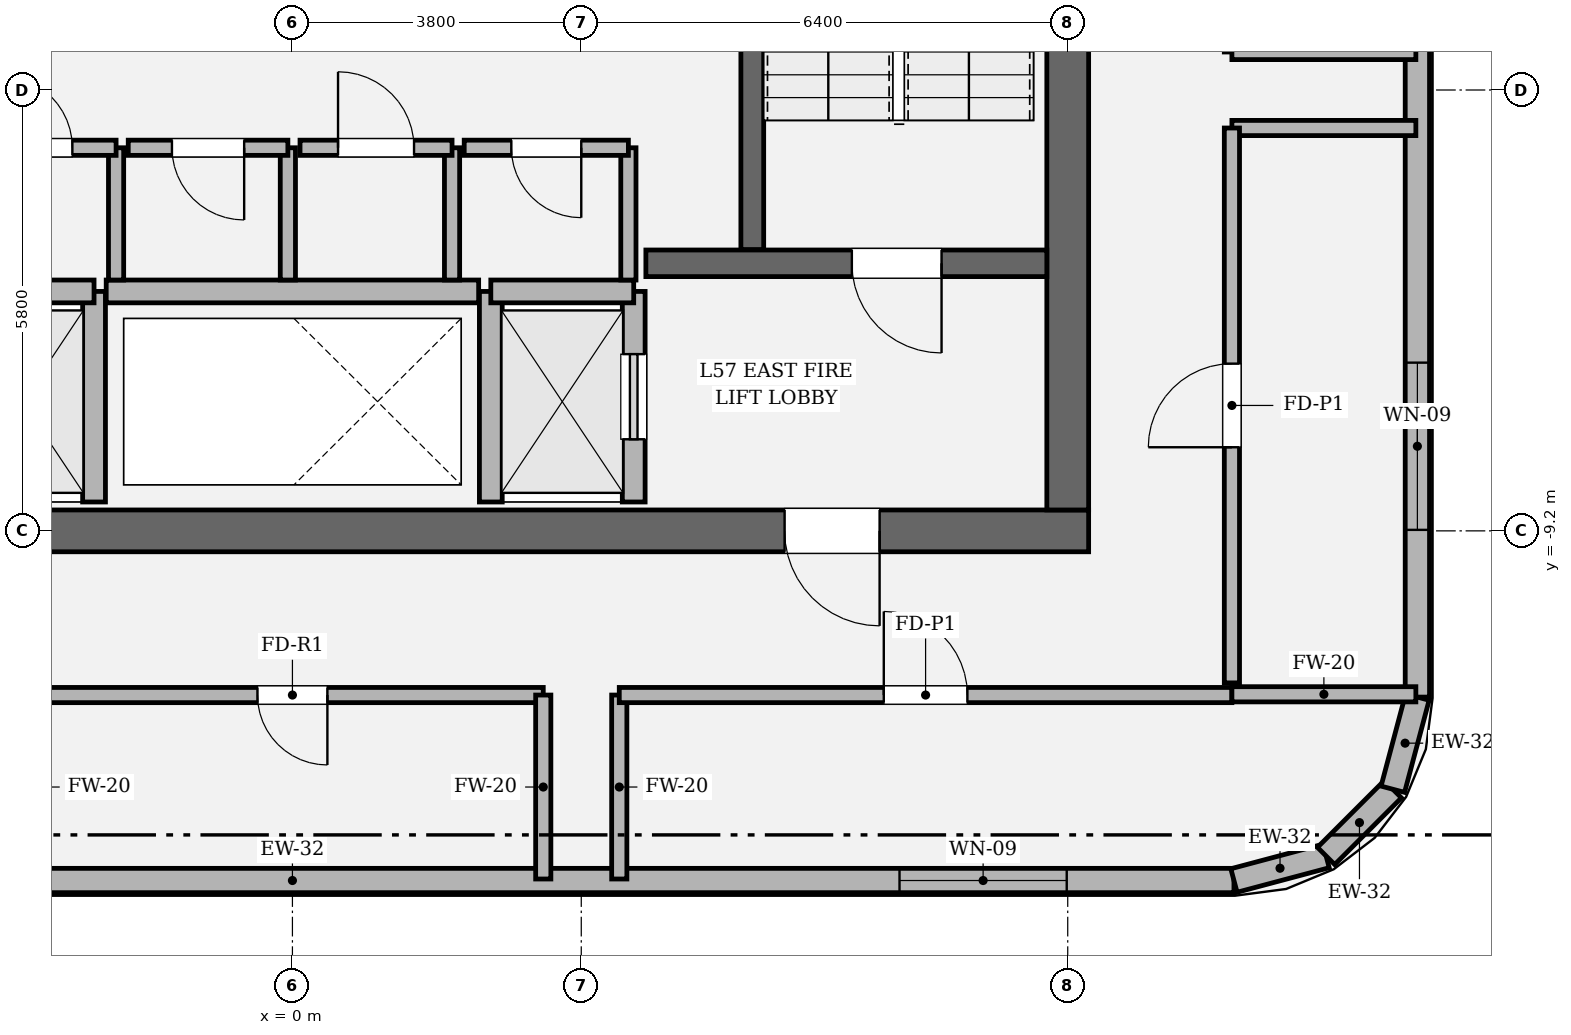
"""IFC4 building model, lengths in metres.
Left out: names, types, materials, properties, quantities, classifications, styles, units other than length and angle.
Written with IfcOpenShell. Run it as: python <this file> out.ifc"""

import sys

from ifc_helpers import new_model, si_unit, direction, frame, frame_2d, origin, place, context, subcontext, project, spatial, rectangle, extrude, element, fill, save


model = new_model("IFC4")
c1 = context("Model", 3, precision=1e-05, world=origin(), true_north=direction((0.0, 1.0)))
c2 = subcontext(c1, "Body", "Model", "MODEL_VIEW")
j1 = project(units=[si_unit("LENGTHUNIT", "METRE"), si_unit("PLANEANGLEUNIT", "RADIAN")], contexts=[c1])
p1 = place(None, origin())
s1 = spatial("IfcSite", under=j1, at=p1, CompositionType="ELEMENT")
p2 = place(p1, origin())
s2 = spatial("IfcBuilding", under=s1, at=p2, CompositionType="ELEMENT")
p3 = place(p2, frame((0.0, 0.0, 241.8)))
s3 = spatial("IfcBuildingStorey", under=s2, at=p3, CompositionType="ELEMENT", Elevation=241.8)
p4 = place(p3, frame((10.475, -9.2, 0.0), z_axis=(0.0, 0.0, 1.0), x_axis=(-1.0, 0.0, 0.0)))
e1 = element("IfcWall", 1, at=p4, inside=s3, PredefinedType="SHEAR", context=c2, shape_type="SweptSolid", body=[
    extrude(rectangle(XDim=20.95, YDim=0.55, at=frame_2d((10.475, 0.0))), origin(), (0.0, 0.0, 1.0), 4.8),
])
p5 = place(p4, frame((2.75, 0.0, 0.0)))
e2 = element("IfcOpeningElement", 2, at=p5, cuts=e1, PredefinedType="OPENING", context=c2, shape_type="SweptSolid", body=[
    extrude(rectangle(XDim=1.25, YDim=2.25, at=frame_2d((0.625, 1.125))), frame((0.0, 0.285, 0.0), z_axis=(0.0, -1.0, 0.0), x_axis=(1.0, 0.0, 0.0)), (0.0, 0.0, 1.0), 0.57),
])
p6 = place(p4, frame((16.95, 0.0, 0.0)))
e3 = element("IfcOpeningElement", 3, at=p6, cuts=e1, PredefinedType="OPENING", context=c2, shape_type="SweptSolid", body=[
    extrude(rectangle(XDim=1.25, YDim=2.25, at=frame_2d((0.625, 1.125))), frame((0.0, 0.285, 0.0), z_axis=(0.0, -1.0, 0.0), x_axis=(1.0, 0.0, 0.0)), (0.0, 0.0, 1.0), 0.57),
])
p7 = place(p3, frame((10.2, 8.925, 0.0), z_axis=(0.0, 0.0, 1.0), x_axis=(0.0, -1.0, 0.0)))
e4 = element("IfcWall", 4, at=p7, inside=s3, PredefinedType="SHEAR", context=c2, shape_type="SweptSolid", body=[
    extrude(rectangle(XDim=17.85, YDim=0.55, at=frame_2d((8.925, 0.0))), origin(), (0.0, 0.0, 1.0), 4.8),
])
p8 = place(p7, frame((3.955, 0.0, 0.0)))
e5 = element("IfcOpeningElement", 5, at=p8, cuts=e4, PredefinedType="OPENING", context=c2, shape_type="SweptSolid", body=[
    extrude(rectangle(XDim=1.18, YDim=2.2, at=frame_2d((0.59, 1.1))), frame((0.0, 0.285, 0.0), z_axis=(0.0, -1.0, 0.0), x_axis=(1.0, 0.0, 0.0)), (0.0, 0.0, 1.0), 0.57),
])
p9 = place(p3, frame((6.05, 3.45, 0.0), z_axis=(0.0, 0.0, 1.0), x_axis=(0.0, -1.0, 0.0)))
e6 = element("IfcWall", 6, at=p9, inside=s3, PredefinedType="SOLIDWALL", context=c2, shape_type="SweptSolid", body=[
    extrude(rectangle(XDim=8.95, YDim=0.3, at=frame_2d((4.475, 0.0))), origin(), (0.0, 0.0, 1.0), 4.8),
])
p10 = place(p3, frame((4.65, -5.68, 0.0), z_axis=(0.0, 0.0, 1.0), x_axis=(1.0, 0.0, 0.0)))
e7 = element("IfcWall", 7, at=p10, inside=s3, PredefinedType="SOLIDWALL", context=c2, shape_type="SweptSolid", body=[
    extrude(rectangle(XDim=5.275, YDim=0.35, at=frame_2d((2.638, 0.0))), origin(), (0.0, 0.0, 1.0), 4.8),
])
p11 = place(p10, frame((2.71, 0.0, 0.0)))
e8 = element("IfcOpeningElement", 8, at=p11, cuts=e7, PredefinedType="OPENING", context=c2, shape_type="SweptSolid", body=[
    extrude(rectangle(XDim=1.18, YDim=2.2, at=frame_2d((0.59, 1.1))), frame((0.0, 0.185, 0.0), z_axis=(0.0, -1.0, 0.0), x_axis=(1.0, 0.0, 0.0)), (0.0, 0.0, 1.0), 0.37),
])
p12 = place(p3, frame((-12.387, -13.8, 0.0), z_axis=(0.0, 0.0, 1.0), x_axis=(1.0, 0.0, 0.0)))
e9 = element("IfcWall", 9, at=p12, inside=s3, PredefinedType="SOLIDWALL", context=c2, shape_type="SweptSolid", body=[
    extrude(rectangle(XDim=24.774, YDim=0.32, at=frame_2d((12.387, 0.0))), origin(), (0.0, 0.0, 1.0), 3.884),
])
p13 = place(p12, frame((2.2, 0.0, 0.9)))
e10 = element("IfcOpeningElement", 10, at=p13, cuts=e9, PredefinedType="OPENING", context=c2, shape_type="SweptSolid", body=[
    extrude(rectangle(XDim=2.2, YDim=1.2, at=frame_2d((1.1, 0.6))), frame((0.0, 0.17, 0.0), z_axis=(0.0, -1.0, 0.0), x_axis=(1.0, 0.0, 0.0)), (0.0, 0.0, 1.0), 0.34),
])
p14 = place(p12, frame((20.374, 0.0, 0.9)))
e11 = element("IfcOpeningElement", 11, at=p14, cuts=e9, PredefinedType="OPENING", context=c2, shape_type="SweptSolid", body=[
    extrude(rectangle(XDim=2.2, YDim=1.2, at=frame_2d((1.1, 0.6))), frame((0.0, 0.17, 0.0), z_axis=(0.0, -1.0, 0.0), x_axis=(1.0, 0.0, 0.0)), (0.0, 0.0, 1.0), 0.34),
])
p15 = place(p3, frame((12.387, -13.8, 0.0), z_axis=(0.0, 0.0, 1.0), x_axis=(0.966283375382, 0.25748094776, 0.0)))
e12 = element("IfcWall", 12, at=p15, inside=s3, PredefinedType="SOLIDWALL", context=c2, shape_type="SweptSolid", body=[
    extrude(rectangle(XDim=1.254, YDim=0.32, at=frame_2d((0.627, 0.0))), origin(), (0.0, 0.0, 1.0), 4.034),
])
p16 = place(p3, frame((13.599, -13.477, 0.0), z_axis=(0.0, 0.0, 1.0), x_axis=(0.707106781187, 0.707106781187, 0.0)))
e13 = element("IfcWall", 13, at=p16, inside=s3, PredefinedType="SOLIDWALL", context=c2, shape_type="SweptSolid", body=[
    extrude(rectangle(XDim=1.242, YDim=0.32, at=frame_2d((0.621, 0.0))), origin(), (0.0, 0.0, 1.0), 4.034),
])
p17 = place(p3, frame((14.477, -12.599, 0.0), z_axis=(0.0, 0.0, 1.0), x_axis=(0.25748094776, 0.966283375382, 0.0)))
e14 = element("IfcWall", 14, at=p17, inside=s3, PredefinedType="SOLIDWALL", context=c2, shape_type="SweptSolid", body=[
    extrude(rectangle(XDim=1.254, YDim=0.32, at=frame_2d((0.627, 0.0))), origin(), (0.0, 0.0, 1.0), 4.034),
])
p18 = place(p3, frame((14.8, -11.387, 0.0), z_axis=(0.0, 0.0, 1.0), x_axis=(0.0, 1.0, 0.0)))
e15 = element("IfcWall", 15, at=p18, inside=s3, PredefinedType="SOLIDWALL", context=c2, shape_type="SweptSolid", body=[
    extrude(rectangle(XDim=22.774, YDim=0.32, at=frame_2d((11.387, 0.0))), origin(), (0.0, 0.0, 1.0), 3.884),
])
p19 = place(p18, frame((2.2, 0.0, 0.9)))
e16 = element("IfcOpeningElement", 16, at=p19, cuts=e15, PredefinedType="OPENING", context=c2, shape_type="SweptSolid", body=[
    extrude(rectangle(XDim=2.2, YDim=1.2, at=frame_2d((1.1, 0.6))), frame((0.0, 0.17, 0.0), z_axis=(0.0, -1.0, 0.0), x_axis=(1.0, 0.0, 0.0)), (0.0, 0.0, 1.0), 0.34),
])
p20 = place(p18, frame((18.374, 0.0, 0.9)))
e17 = element("IfcOpeningElement", 17, at=p20, cuts=e15, PredefinedType="OPENING", context=c2, shape_type="SweptSolid", body=[
    extrude(rectangle(XDim=2.2, YDim=1.2, at=frame_2d((1.1, 0.6))), frame((0.0, 0.17, 0.0), z_axis=(0.0, -1.0, 0.0), x_axis=(1.0, 0.0, 0.0)), (0.0, 0.0, 1.0), 0.34),
])
p21 = place(p3, frame((-2.61, -8.82, 0.0), z_axis=(0.0, 0.0, 1.0), x_axis=(0.0, 1.0, 0.0)))
e18 = element("IfcWall", 18, at=p21, inside=s3, PredefinedType="SOLIDWALL", context=c2, shape_type="SweptSolid", body=[
    extrude(rectangle(XDim=2.77, YDim=0.3, at=frame_2d((1.385, 0.0))), origin(), (0.0, 0.0, 1.0), 4.54),
])
p22 = place(p3, frame((-4.49, -6.05, 0.0), z_axis=(0.0, 0.0, 1.0), x_axis=(1.0, 0.0, 0.0)))
e19 = element("IfcWall", 19, at=p22, inside=s3, PredefinedType="SOLIDWALL", context=c2, shape_type="SweptSolid", body=[
    extrude(rectangle(XDim=1.88, YDim=0.3, at=frame_2d((0.94, 0.0))), origin(), (0.0, 0.0, 1.0), 4.54),
])
p23 = place(p3, frame((4.49, -8.82, 0.0), z_axis=(0.0, 0.0, 1.0), x_axis=(0.0, 1.0, 0.0)))
e20 = element("IfcWall", 20, at=p23, inside=s3, PredefinedType="SOLIDWALL", context=c2, shape_type="SweptSolid", body=[
    extrude(rectangle(XDim=2.77, YDim=0.3, at=frame_2d((1.385, 0.0))), origin(), (0.0, 0.0, 1.0), 4.54),
])
p24 = place(p23, frame((0.825, 0.0, 0.0)))
e21 = element("IfcOpeningElement", 21, at=p24, cuts=e20, PredefinedType="OPENING", context=c2, shape_type="SweptSolid", body=[
    extrude(rectangle(XDim=1.12, YDim=2.25, at=frame_2d((0.56, 1.125))), frame((0.0, 0.16, 0.0), z_axis=(0.0, -1.0, 0.0), x_axis=(1.0, 0.0, 0.0)), (0.0, 0.0, 1.0), 0.32),
])
p25 = place(p3, frame((2.61, -8.82, 0.0), z_axis=(0.0, 0.0, 1.0), x_axis=(0.0, 1.0, 0.0)))
e22 = element("IfcWall", 22, at=p25, inside=s3, PredefinedType="SOLIDWALL", context=c2, shape_type="SweptSolid", body=[
    extrude(rectangle(XDim=2.77, YDim=0.3, at=frame_2d((1.385, 0.0))), origin(), (0.0, 0.0, 1.0), 4.54),
])
p26 = place(p3, frame((2.61, -6.05, 0.0), z_axis=(0.0, 0.0, 1.0), x_axis=(1.0, 0.0, 0.0)))
e23 = element("IfcWall", 23, at=p26, inside=s3, PredefinedType="SOLIDWALL", context=c2, shape_type="SweptSolid", body=[
    extrude(rectangle(XDim=1.88, YDim=0.3, at=frame_2d((0.94, 0.0))), origin(), (0.0, 0.0, 1.0), 4.54),
])
p27 = place(p3, frame((-2.45, -6.05, 0.0), z_axis=(0.0, 0.0, 1.0), x_axis=(1.0, 0.0, 0.0)))
e24 = element("IfcWall", 24, at=p27, inside=s3, PredefinedType="SOLIDWALL", context=c2, shape_type="SweptSolid", body=[
    extrude(rectangle(XDim=4.9, YDim=0.3, at=frame_2d((2.45, 0.0))), origin(), (0.0, 0.0, 1.0), 4.54),
])
p28 = place(p3, frame((-2.32, -5.9, 0.0), z_axis=(0.0, 0.0, 1.0), x_axis=(0.0, 1.0, 0.0)))
e25 = element("IfcWall", 25, at=p28, inside=s3, PredefinedType="SOLIDWALL", context=c2, shape_type="SweptSolid", body=[
    extrude(rectangle(XDim=1.74, YDim=0.2, at=frame_2d((0.87, 0.0))), origin(), (0.0, 0.0, 1.0), 4.54),
])
p29 = place(p3, frame((-2.32, -4.16, 0.0), z_axis=(0.0, 0.0, 1.0), x_axis=(-1.0, 0.0, 0.0)))
e26 = element("IfcWall", 26, at=p29, inside=s3, PredefinedType="SOLIDWALL", context=c2, shape_type="SweptSolid", body=[
    extrude(rectangle(XDim=2.1, YDim=0.2, at=frame_2d((1.05, 0.0))), origin(), (0.0, 0.0, 1.0), 4.54),
])
p30 = place(p29, frame((0.575, 0.0, 0.0)))
e27 = element("IfcOpeningElement", 27, at=p30, cuts=e26, PredefinedType="OPENING", context=c2, shape_type="SweptSolid", body=[
    extrude(rectangle(XDim=0.95, YDim=2.15, at=frame_2d((0.475, 1.075))), frame((0.0, 0.11, 0.0), z_axis=(0.0, -1.0, 0.0), x_axis=(1.0, 0.0, 0.0)), (0.0, 0.0, 1.0), 0.22),
])
p31 = place(p3, frame((-0.06, -5.9, 0.0), z_axis=(0.0, 0.0, 1.0), x_axis=(0.0, 1.0, 0.0)))
e28 = element("IfcWall", 28, at=p31, inside=s3, PredefinedType="SOLIDWALL", context=c2, shape_type="SweptSolid", body=[
    extrude(rectangle(XDim=1.74, YDim=0.2, at=frame_2d((0.87, 0.0))), origin(), (0.0, 0.0, 1.0), 4.54),
])
p32 = place(p3, frame((-0.06, -4.16, 0.0), z_axis=(0.0, 0.0, 1.0), x_axis=(-1.0, 0.0, 0.0)))
e29 = element("IfcWall", 29, at=p32, inside=s3, PredefinedType="SOLIDWALL", context=c2, shape_type="SweptSolid", body=[
    extrude(rectangle(XDim=2.1, YDim=0.2, at=frame_2d((1.05, 0.0))), origin(), (0.0, 0.0, 1.0), 4.54),
])
p33 = place(p32, frame((0.575, 0.0, 0.0)))
e30 = element("IfcOpeningElement", 30, at=p33, cuts=e29, PredefinedType="OPENING", context=c2, shape_type="SweptSolid", body=[
    extrude(rectangle(XDim=0.95, YDim=2.15, at=frame_2d((0.475, 1.075))), frame((0.0, 0.11, 0.0), z_axis=(0.0, -1.0, 0.0), x_axis=(1.0, 0.0, 0.0)), (0.0, 0.0, 1.0), 0.22),
])
p34 = place(p3, frame((2.1, -5.9, 0.0), z_axis=(0.0, 0.0, 1.0), x_axis=(0.0, 1.0, 0.0)))
e31 = element("IfcWall", 31, at=p34, inside=s3, PredefinedType="SOLIDWALL", context=c2, shape_type="SweptSolid", body=[
    extrude(rectangle(XDim=1.74, YDim=0.2, at=frame_2d((0.87, 0.0))), origin(), (0.0, 0.0, 1.0), 4.54),
])
p35 = place(p3, frame((2.1, -4.16, 0.0), z_axis=(0.0, 0.0, 1.0), x_axis=(-1.0, 0.0, 0.0)))
e32 = element("IfcWall", 32, at=p35, inside=s3, PredefinedType="SOLIDWALL", context=c2, shape_type="SweptSolid", body=[
    extrude(rectangle(XDim=2.0, YDim=0.2, at=frame_2d((1.0, 0.0))), origin(), (0.0, 0.0, 1.0), 4.54),
])
p36 = place(p35, frame((0.5, 0.0, 0.0)))
e33 = element("IfcOpeningElement", 33, at=p36, cuts=e32, PredefinedType="OPENING", context=c2, shape_type="SweptSolid", body=[
    extrude(rectangle(XDim=1.0, YDim=2.15, at=frame_2d((0.5, 1.075))), frame((0.0, 0.11, 0.0), z_axis=(0.0, -1.0, 0.0), x_axis=(1.0, 0.0, 0.0)), (0.0, 0.0, 1.0), 0.22),
])
p37 = place(p3, frame((4.42, -5.9, 0.0), z_axis=(0.0, 0.0, 1.0), x_axis=(0.0, 1.0, 0.0)))
e34 = element("IfcWall", 34, at=p37, inside=s3, PredefinedType="SOLIDWALL", context=c2, shape_type="SweptSolid", body=[
    extrude(rectangle(XDim=1.74, YDim=0.2, at=frame_2d((0.87, 0.0))), origin(), (0.0, 0.0, 1.0), 4.54),
])
p38 = place(p3, frame((4.42, -4.16, 0.0), z_axis=(0.0, 0.0, 1.0), x_axis=(-1.0, 0.0, 0.0)))
e35 = element("IfcWall", 35, at=p38, inside=s3, PredefinedType="SOLIDWALL", context=c2, shape_type="SweptSolid", body=[
    extrude(rectangle(XDim=2.16, YDim=0.2, at=frame_2d((1.08, 0.0))), origin(), (0.0, 0.0, 1.0), 4.54),
])
p39 = place(p38, frame((0.62, 0.0, 0.0)))
e36 = element("IfcOpeningElement", 36, at=p39, cuts=e35, PredefinedType="OPENING", context=c2, shape_type="SweptSolid", body=[
    extrude(rectangle(XDim=0.92, YDim=2.1, at=frame_2d((0.46, 1.05))), frame((0.0, 0.11, 0.0), z_axis=(0.0, -1.0, 0.0), x_axis=(1.0, 0.0, 0.0)), (0.0, 0.0, 1.0), 0.22),
])
p40 = place(p3, frame((-3.3, -11.36, 0.0), z_axis=(0.0, 0.0, 1.0), x_axis=(1.0, 0.0, 0.0)))
e37 = element("IfcWall", 37, at=p40, inside=s3, PredefinedType="SOLIDWALL", context=c2, shape_type="SweptSolid", body=[
    extrude(rectangle(XDim=6.6, YDim=0.2, at=frame_2d((3.3, 0.0))), origin(), (0.0, 0.0, 1.0), 4.54),
])
p41 = place(p40, frame((2.84, 0.0, 0.0)))
e38 = element("IfcOpeningElement", 38, at=p41, cuts=e37, PredefinedType="OPENING", context=c2, shape_type="SweptSolid", body=[
    extrude(rectangle(XDim=0.92, YDim=2.1, at=frame_2d((0.46, 1.05))), frame((0.0, 0.11, 0.0), z_axis=(0.0, -1.0, 0.0), x_axis=(1.0, 0.0, 0.0)), (0.0, 0.0, 1.0), 0.22),
])
for number, where, z_axis, x_axis in (
    (39, (3.3, -11.36, 0.0), (0.0, 0.0, 1.0), (0.0, -1.0, 0.0)),
    (40, (4.3, -13.78, 0.0), (0.0, 0.0, 1.0), (0.0, 1.0, 0.0)),
):
    element("IfcWall", number, at=place(p3, frame(where, z_axis=z_axis, x_axis=x_axis)), inside=s3, PredefinedType="SOLIDWALL", context=c2, shape_type="SweptSolid", body=[
        extrude(rectangle(XDim=2.42, YDim=0.2, at=frame_2d((1.21, 0.0))), origin(), (0.0, 0.0, 1.0), 4.034),
    ])
p42 = place(p3, frame((4.3, -11.36, 0.0), z_axis=(0.0, 0.0, 1.0), x_axis=(1.0, 0.0, 0.0)))
e41 = element("IfcWall", 41, at=p42, inside=s3, PredefinedType="SOLIDWALL", context=c2, shape_type="SweptSolid", body=[
    extrude(rectangle(XDim=8.06, YDim=0.2, at=frame_2d((4.03, 0.0))), origin(), (0.0, 0.0, 1.0), 4.54),
])
p43 = place(p42, frame((3.48, 0.0, 0.0)))
e42 = element("IfcOpeningElement", 42, at=p43, cuts=e41, PredefinedType="OPENING", context=c2, shape_type="SweptSolid", body=[
    extrude(rectangle(XDim=1.1, YDim=2.2, at=frame_2d((0.55, 1.1))), frame((0.0, 0.11, 0.0), z_axis=(0.0, -1.0, 0.0), x_axis=(1.0, 0.0, 0.0)), (0.0, 0.0, 1.0), 0.22),
])
for number, where, z_axis, x_axis in (
    (43, (12.36, -11.35, 0.0), (0.0, 0.0, 1.0), (1.0, 0.0, 0.0)),
    (44, (12.36, -3.9, 0.0), (0.0, 0.0, 1.0), (1.0, 0.0, 0.0)),
):
    element("IfcWall", number, at=place(p3, frame(where, z_axis=z_axis, x_axis=x_axis)), inside=s3, PredefinedType="SOLIDWALL", context=c2, shape_type="SweptSolid", body=[
        extrude(rectangle(XDim=2.42, YDim=0.2, at=frame_2d((1.21, 0.0))), origin(), (0.0, 0.0, 1.0), 4.034),
    ])
p44 = place(p3, frame((12.36, -11.2, 0.0), z_axis=(0.0, 0.0, 1.0), x_axis=(0.0, 1.0, 0.0)))
e45 = element("IfcWall", 45, at=p44, inside=s3, PredefinedType="SOLIDWALL", context=c2, shape_type="SweptSolid", body=[
    extrude(rectangle(XDim=7.3, YDim=0.2, at=frame_2d((3.65, 0.0))), origin(), (0.0, 0.0, 1.0), 4.54),
])
p45 = place(p44, frame((3.1, 0.0, 0.0)))
e46 = element("IfcOpeningElement", 46, at=p45, cuts=e45, PredefinedType="OPENING", context=c2, shape_type="SweptSolid", body=[
    extrude(rectangle(XDim=1.1, YDim=2.2, at=frame_2d((0.55, 1.1))), frame((0.0, 0.11, 0.0), z_axis=(0.0, -1.0, 0.0), x_axis=(1.0, 0.0, 0.0)), (0.0, 0.0, 1.0), 0.22),
])
p46 = place(p3, frame((14.78, -2.9, 0.0), z_axis=(0.0, 0.0, 1.0), x_axis=(-1.0, 0.0, 0.0)))
e47 = element("IfcWall", 47, at=p46, inside=s3, PredefinedType="SOLIDWALL", context=c2, shape_type="SweptSolid", body=[
    extrude(rectangle(XDim=2.42, YDim=0.2, at=frame_2d((1.21, 0.0))), origin(), (0.0, 0.0, 1.0), 4.034),
])
p47 = place(p14, origin())
e48 = element("IfcWindow", 48, at=p47, inside=s3, PartitioningType="SINGLE_PANEL", PredefinedType="WINDOW", context=c2, shape_type="SweptSolid", body=[
    extrude(rectangle(XDim=2.2, YDim=1.2, at=frame_2d((1.1, 0.6))), frame((0.0, 0.03, 0.0), z_axis=(0.0, -1.0, 0.0), x_axis=(1.0, 0.0, 0.0)), (0.0, 0.0, 1.0), 0.06),
])
fill(e11, e48)
p48 = place(p19, origin())
e49 = element("IfcWindow", 49, at=p48, inside=s3, PartitioningType="SINGLE_PANEL", PredefinedType="WINDOW", context=c2, shape_type="SweptSolid", body=[
    extrude(rectangle(XDim=2.2, YDim=1.2, at=frame_2d((1.1, 0.6))), frame((0.0, 0.03, 0.0), z_axis=(0.0, -1.0, 0.0), x_axis=(1.0, 0.0, 0.0)), (0.0, 0.0, 1.0), 0.06),
])
fill(e16, e49)
p49 = place(p11, origin())
e50 = element("IfcDoor", 50, at=p49, inside=s3, OperationType="SINGLE_SWING_RIGHT", PredefinedType="DOOR", context=c2, shape_type="SweptSolid", body=[
    extrude(rectangle(XDim=1.18, YDim=2.2, at=frame_2d((0.59, 1.1))), frame((0.0, 0.025, 0.0), z_axis=(0.0, -1.0, 0.0), x_axis=(1.0, 0.0, 0.0)), (0.0, 0.0, 1.0), 0.05),
])
fill(e8, e50)
p50 = place(p5, origin())
e51 = element("IfcDoor", 51, at=p50, inside=s3, OperationType="SINGLE_SWING_LEFT", PredefinedType="DOOR", context=c2, shape_type="SweptSolid", body=[
    extrude(rectangle(XDim=1.25, YDim=2.25, at=frame_2d((0.625, 1.125))), frame((0.0, 0.025, 0.0), z_axis=(0.0, -1.0, 0.0), x_axis=(1.0, 0.0, 0.0)), (0.0, 0.0, 1.0), 0.05),
])
fill(e2, e51)
p51 = place(p24, origin())
e52 = element("IfcDoor", 52, at=p51, inside=s3, OperationType="SLIDING_TO_RIGHT", PredefinedType="DOOR", context=c2, shape_type="SweptSolid", body=[
    extrude(rectangle(XDim=1.12, YDim=2.25, at=frame_2d((0.56, 1.125))), frame((0.0, 0.025, 0.0), z_axis=(0.0, -1.0, 0.0), x_axis=(1.0, 0.0, 0.0)), (0.0, 0.0, 1.0), 0.05),
])
fill(e21, e52)
p52 = place(p30, origin())
e53 = element("IfcDoor", 53, at=p52, inside=s3, OperationType="SINGLE_SWING_RIGHT", PredefinedType="DOOR", context=c2, shape_type="SweptSolid", body=[
    extrude(rectangle(XDim=0.95, YDim=2.15, at=frame_2d((0.475, 1.075))), frame((0.0, 0.025, 0.0), z_axis=(0.0, -1.0, 0.0), x_axis=(1.0, 0.0, 0.0)), (0.0, 0.0, 1.0), 0.05),
])
fill(e27, e53)
p53 = place(p33, origin())
e54 = element("IfcDoor", 54, at=p53, inside=s3, OperationType="SINGLE_SWING_LEFT", PredefinedType="DOOR", context=c2, shape_type="SweptSolid", body=[
    extrude(rectangle(XDim=0.95, YDim=2.15, at=frame_2d((0.475, 1.075))), frame((0.0, 0.025, 0.0), z_axis=(0.0, -1.0, 0.0), x_axis=(1.0, 0.0, 0.0)), (0.0, 0.0, 1.0), 0.05),
])
fill(e30, e54)
p54 = place(p36, origin())
e55 = element("IfcDoor", 55, at=p54, inside=s3, OperationType="SINGLE_SWING_RIGHT", PredefinedType="DOOR", context=c2, shape_type="SweptSolid", body=[
    extrude(rectangle(XDim=1.0, YDim=2.15, at=frame_2d((0.5, 1.075))), frame((0.0, 0.025, 0.0), z_axis=(0.0, -1.0, 0.0), x_axis=(1.0, 0.0, 0.0)), (0.0, 0.0, 1.0), 0.05),
])
fill(e33, e55)
p55 = place(p39, origin())
e56 = element("IfcDoor", 56, at=p55, inside=s3, OperationType="SINGLE_SWING_LEFT", PredefinedType="DOOR", context=c2, shape_type="SweptSolid", body=[
    extrude(rectangle(XDim=0.92, YDim=2.1, at=frame_2d((0.46, 1.05))), frame((0.0, 0.025, 0.0), z_axis=(0.0, -1.0, 0.0), x_axis=(1.0, 0.0, 0.0)), (0.0, 0.0, 1.0), 0.05),
])
fill(e36, e56)
p56 = place(p41, origin())
e57 = element("IfcDoor", 57, at=p56, inside=s3, OperationType="SINGLE_SWING_RIGHT", PredefinedType="DOOR", context=c2, shape_type="SweptSolid", body=[
    extrude(rectangle(XDim=0.92, YDim=2.1, at=frame_2d((0.46, 1.05))), frame((0.0, 0.025, 0.0), z_axis=(0.0, -1.0, 0.0), x_axis=(1.0, 0.0, 0.0)), (0.0, 0.0, 1.0), 0.05),
])
fill(e38, e57)
p57 = place(p43, origin())
e58 = element("IfcDoor", 58, at=p57, inside=s3, OperationType="SINGLE_SWING_LEFT", PredefinedType="DOOR", context=c2, shape_type="SweptSolid", body=[
    extrude(rectangle(XDim=1.1, YDim=2.2, at=frame_2d((0.55, 1.1))), frame((0.0, 0.025, 0.0), z_axis=(0.0, -1.0, 0.0), x_axis=(1.0, 0.0, 0.0)), (0.0, 0.0, 1.0), 0.05),
])
fill(e42, e58)
p58 = place(p45, origin())
e59 = element("IfcDoor", 59, at=p58, inside=s3, OperationType="SINGLE_SWING_LEFT", PredefinedType="DOOR", context=c2, shape_type="SweptSolid", body=[
    extrude(rectangle(XDim=1.1, YDim=2.2, at=frame_2d((0.55, 1.1))), frame((0.0, 0.025, 0.0), z_axis=(0.0, -1.0, 0.0), x_axis=(1.0, 0.0, 0.0)), (0.0, 0.0, 1.0), 0.05),
])
fill(e46, e59)
save(model, sys.argv[1])
